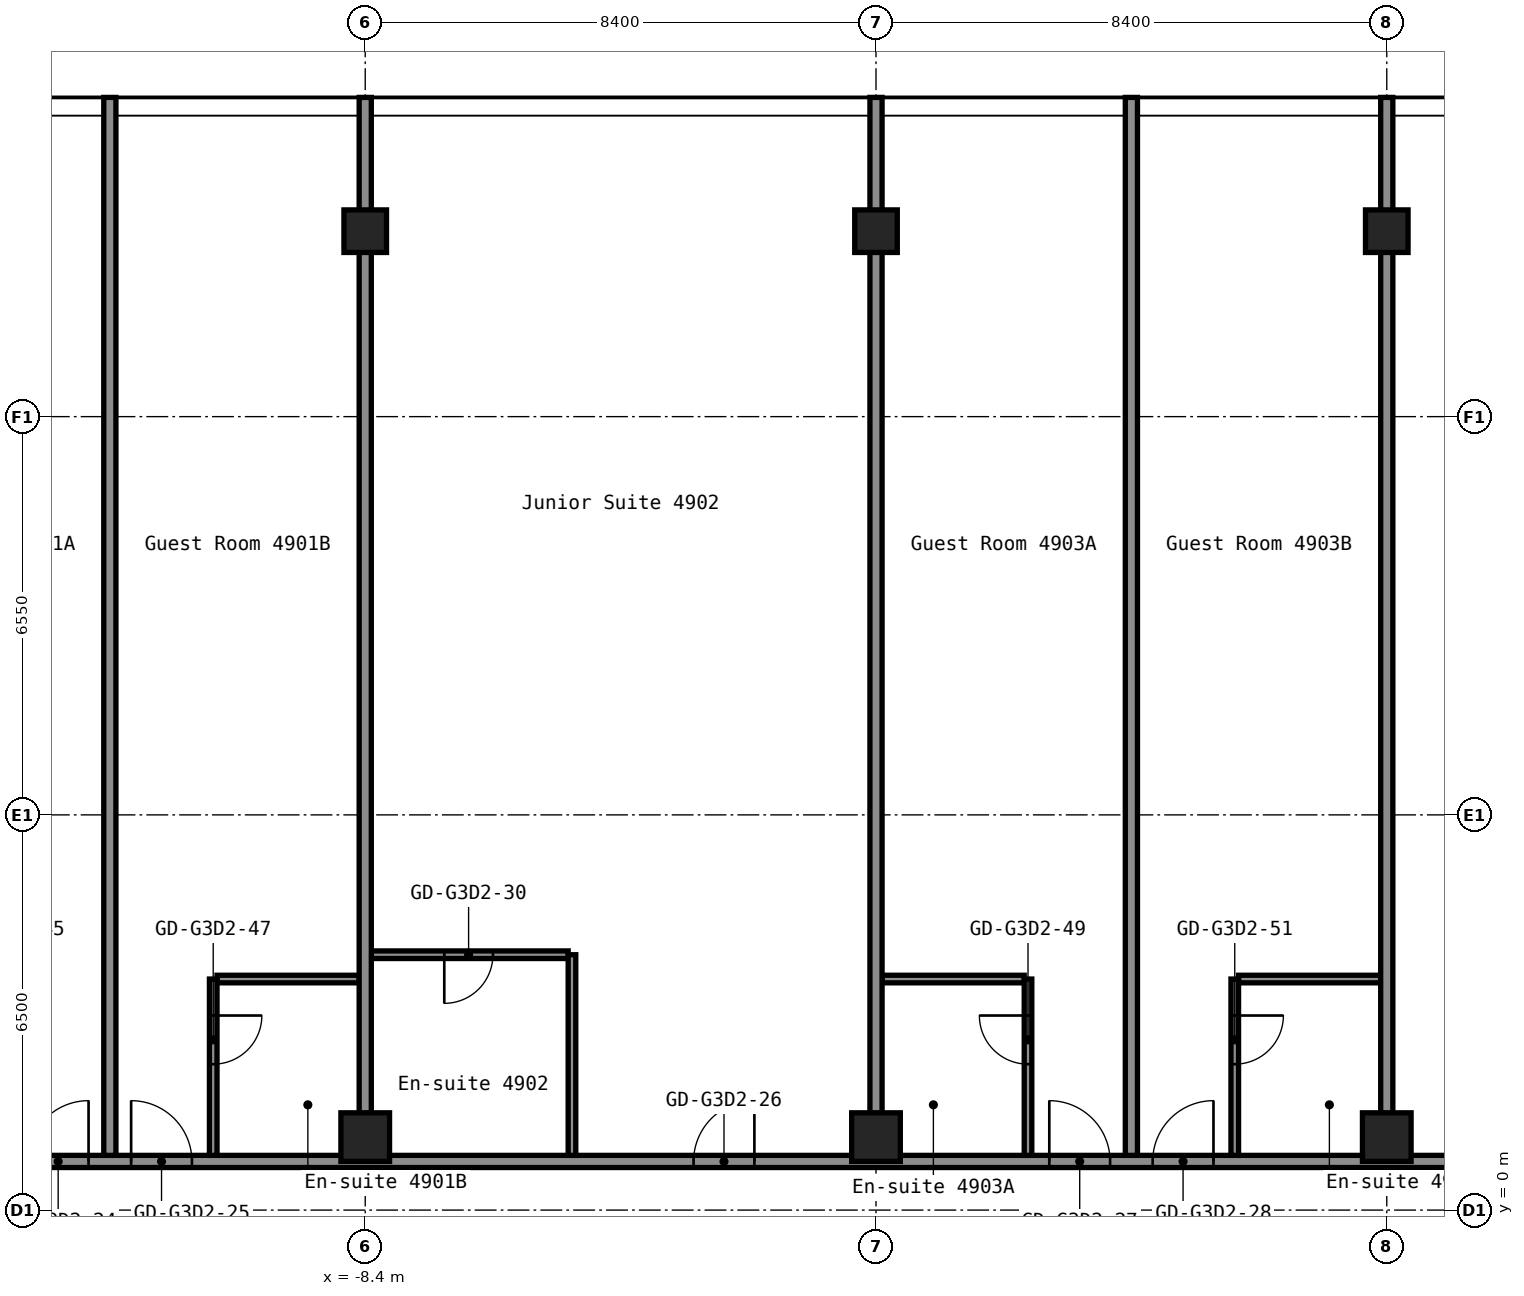
"""IFC4 building model, lengths in metres.
Left out: names, types, materials, properties, quantities, classifications, styles, units other than length and angle.
Written with IfcOpenShell. Run it as: python <this file> out.ifc"""

import sys

from ifc_helpers import new_model, si_unit, direction, frame, frame_2d, origin, origin_2d, place, context, subcontext, project, spatial, rectangle, hollow_rectangle, extrude, element, fill, save


model = new_model("IFC4")
c1 = context("Model", 3, precision=1e-05, world=origin(), true_north=direction((0.0, 1.0)))
c2 = subcontext(c1, "Body", "Model", "MODEL_VIEW")
j1 = project(units=[si_unit("LENGTHUNIT", "METRE"), si_unit("PLANEANGLEUNIT", "RADIAN")], contexts=[c1])
p1 = place(None, origin())
s1 = spatial("IfcSite", under=j1, at=p1, CompositionType="ELEMENT")
p2 = place(p1, origin())
s2 = spatial("IfcBuilding", under=s1, at=p2, CompositionType="ELEMENT")
p3 = place(p2, frame((0.0, 0.0, 172.6)))
s3 = spatial("IfcBuildingStorey", under=s2, at=p3, CompositionType="ELEMENT", Elevation=172.6)
p4 = place(p3, frame((-8.4, 1.2, 0.0), z_axis=(0.0, 0.0, 1.0), x_axis=(1.0, 0.0, 0.0)))
e1 = element("IfcColumn", 1, at=p4, inside=s3, PredefinedType="COLUMN", context=c2, shape_type="SweptSolid", body=[
    extrude(hollow_rectangle(XDim=0.8, YDim=0.8, WallThickness=0.032, at=origin_2d()), origin(), (0.0, 0.0, 1.0), 2.9),
])
p5 = place(p3, frame((-8.4, 16.1, 0.0), z_axis=(0.0, 0.0, 1.0), x_axis=(1.0, 0.0, 0.0)))
e2 = element("IfcColumn", 2, at=p5, inside=s3, PredefinedType="COLUMN", context=c2, shape_type="SweptSolid", body=[
    extrude(hollow_rectangle(XDim=0.7, YDim=0.7, WallThickness=0.028, at=origin_2d()), origin(), (0.0, 0.0, 1.0), 2.9),
])
p6 = place(p3, frame((0.0, 1.2, 0.0), z_axis=(0.0, 0.0, 1.0), x_axis=(1.0, 0.0, 0.0)))
e3 = element("IfcColumn", 3, at=p6, inside=s3, PredefinedType="COLUMN", context=c2, shape_type="SweptSolid", body=[
    extrude(hollow_rectangle(XDim=0.8, YDim=0.8, WallThickness=0.032, at=origin_2d()), origin(), (0.0, 0.0, 1.0), 2.9),
])
p7 = place(p3, frame((0.0, 16.1, 0.0), z_axis=(0.0, 0.0, 1.0), x_axis=(1.0, 0.0, 0.0)))
e4 = element("IfcColumn", 4, at=p7, inside=s3, PredefinedType="COLUMN", context=c2, shape_type="SweptSolid", body=[
    extrude(hollow_rectangle(XDim=0.7, YDim=0.7, WallThickness=0.028, at=origin_2d()), origin(), (0.0, 0.0, 1.0), 2.9),
])
p8 = place(p3, frame((8.4, 1.2, 0.0), z_axis=(0.0, 0.0, 1.0), x_axis=(1.0, 0.0, 0.0)))
e5 = element("IfcColumn", 5, at=p8, inside=s3, PredefinedType="COLUMN", context=c2, shape_type="SweptSolid", body=[
    extrude(hollow_rectangle(XDim=0.8, YDim=0.8, WallThickness=0.032, at=origin_2d()), origin(), (0.0, 0.0, 1.0), 2.9),
])
p9 = place(p3, frame((8.4, 16.1, 0.0), z_axis=(0.0, 0.0, 1.0), x_axis=(1.0, 0.0, 0.0)))
e6 = element("IfcColumn", 6, at=p9, inside=s3, PredefinedType="COLUMN", context=c2, shape_type="SweptSolid", body=[
    extrude(hollow_rectangle(XDim=0.7, YDim=0.7, WallThickness=0.028, at=origin_2d()), origin(), (0.0, 0.0, 1.0), 2.9),
])
p10 = place(p3, frame((-16.8, 0.8, 0.0), z_axis=(0.0, 0.0, 1.0), x_axis=(1.0, 0.0, 0.0)))
e7 = element("IfcWall", 7, at=p10, inside=s3, PredefinedType="PARTITIONING", context=c2, shape_type="SweptSolid", body=[
    extrude(rectangle(XDim=33.6, YDim=0.2, at=frame_2d((16.8, 0.0))), origin(), (0.0, 0.0, 1.0), 2.9),
])
p11 = place(p10, frame((2.85, 0.0, 0.0)))
e8 = element("IfcOpeningElement", 8, at=p11, cuts=e7, PredefinedType="OPENING", context=c2, shape_type="SweptSolid", body=[
    extrude(rectangle(XDim=1.0, YDim=2.1, at=frame_2d((0.5, 1.05))), frame((0.0, 0.11, 0.0), z_axis=(0.0, -1.0, 0.0), x_axis=(1.0, 0.0, 0.0)), (0.0, 0.0, 1.0), 0.22),
])
p12 = place(p10, frame((4.55, 0.0, 0.0)))
e9 = element("IfcOpeningElement", 9, at=p12, cuts=e7, PredefinedType="OPENING", context=c2, shape_type="SweptSolid", body=[
    extrude(rectangle(XDim=1.0, YDim=2.1, at=frame_2d((0.5, 1.05))), frame((0.0, 0.11, 0.0), z_axis=(0.0, -1.0, 0.0), x_axis=(1.0, 0.0, 0.0)), (0.0, 0.0, 1.0), 0.22),
])
p13 = place(p10, frame((13.8, 0.0, 0.0)))
e10 = element("IfcOpeningElement", 10, at=p13, cuts=e7, PredefinedType="OPENING", context=c2, shape_type="SweptSolid", body=[
    extrude(rectangle(XDim=1.0, YDim=2.1, at=frame_2d((0.5, 1.05))), frame((0.0, 0.11, 0.0), z_axis=(0.0, -1.0, 0.0), x_axis=(1.0, 0.0, 0.0)), (0.0, 0.0, 1.0), 0.22),
])
p14 = place(p10, frame((19.65, 0.0, 0.0)))
e11 = element("IfcOpeningElement", 11, at=p14, cuts=e7, PredefinedType="OPENING", context=c2, shape_type="SweptSolid", body=[
    extrude(rectangle(XDim=1.0, YDim=2.1, at=frame_2d((0.5, 1.05))), frame((0.0, 0.11, 0.0), z_axis=(0.0, -1.0, 0.0), x_axis=(1.0, 0.0, 0.0)), (0.0, 0.0, 1.0), 0.22),
])
p15 = place(p10, frame((21.35, 0.0, 0.0)))
e12 = element("IfcOpeningElement", 12, at=p15, cuts=e7, PredefinedType="OPENING", context=c2, shape_type="SweptSolid", body=[
    extrude(rectangle(XDim=1.0, YDim=2.1, at=frame_2d((0.5, 1.05))), frame((0.0, 0.11, 0.0), z_axis=(0.0, -1.0, 0.0), x_axis=(1.0, 0.0, 0.0)), (0.0, 0.0, 1.0), 0.22),
])
p16 = place(p10, frame((27.1, 0.0, 0.0)))
e13 = element("IfcOpeningElement", 13, at=p16, cuts=e7, PredefinedType="OPENING", context=c2, shape_type="SweptSolid", body=[
    extrude(rectangle(XDim=1.0, YDim=2.1, at=frame_2d((0.5, 1.05))), frame((0.0, 0.11, 0.0), z_axis=(0.0, -1.0, 0.0), x_axis=(1.0, 0.0, 0.0)), (0.0, 0.0, 1.0), 0.22),
])
for number, where, z_axis, x_axis in (
    (14, (-10.837, 3.8, 0.0), (0.0, 0.0, 1.0), (1.0, 0.0, 0.0)),
    (15, (0.1, 3.8, 0.0), (0.0, 0.0, 1.0), (1.0, 0.0, 0.0)),
):
    element("IfcWall", number, at=place(p3, frame(where, z_axis=z_axis, x_axis=x_axis)), inside=s3, PredefinedType="PARTITIONING", context=c2, shape_type="SweptSolid", body=[
        extrude(rectangle(XDim=2.337, YDim=0.125, at=frame_2d((1.169, 0.0))), origin(), (0.0, 0.0, 1.0), 2.9),
    ])
p17 = place(p3, frame((5.962, 3.8, 0.0), z_axis=(0.0, 0.0, 1.0), x_axis=(1.0, 0.0, 0.0)))
e16 = element("IfcWall", 16, at=p17, inside=s3, PredefinedType="PARTITIONING", context=c2, shape_type="SweptSolid", body=[
    extrude(rectangle(XDim=2.338, YDim=0.125, at=frame_2d((1.169, 0.0))), origin(), (0.0, 0.0, 1.0), 2.9),
])
p18 = place(p3, frame((-8.3, 4.2, 0.0), z_axis=(0.0, 0.0, 1.0), x_axis=(1.0, 0.0, 0.0)))
e17 = element("IfcWall", 17, at=p18, inside=s3, PredefinedType="PARTITIONING", context=c2, shape_type="SweptSolid", body=[
    extrude(rectangle(XDim=3.238, YDim=0.125, at=frame_2d((1.619, 0.0))), origin(), (0.0, 0.0, 1.0), 2.9),
])
p19 = place(p18, frame((1.2, 0.0, 0.0)))
e18 = element("IfcOpeningElement", 18, at=p19, cuts=e17, PredefinedType="OPENING", context=c2, shape_type="SweptSolid", body=[
    extrude(rectangle(XDim=0.8, YDim=2.1, at=frame_2d((0.4, 1.05))), frame((0.0, 0.073, 0.0), z_axis=(0.0, -1.0, 0.0), x_axis=(1.0, 0.0, 0.0)), (0.0, 0.0, 1.0), 0.145),
])
p20 = place(p3, frame((-12.6, 0.9, 0.0), z_axis=(0.0, 0.0, 1.0), x_axis=(0.0, 1.0, 0.0)))
e19 = element("IfcWall", 19, at=p20, inside=s3, PredefinedType="PARTITIONING", context=c2, shape_type="SweptSolid", body=[
    extrude(rectangle(XDim=17.4, YDim=0.2, at=frame_2d((8.7, 0.0))), origin(), (0.0, 0.0, 1.0), 2.9),
])
p21 = place(p3, frame((-10.9, 0.9, 0.0), z_axis=(0.0, 0.0, 1.0), x_axis=(0.0, 1.0, 0.0)))
e20 = element("IfcWall", 20, at=p21, inside=s3, PredefinedType="PARTITIONING", context=c2, shape_type="SweptSolid", body=[
    extrude(rectangle(XDim=2.9, YDim=0.125, at=frame_2d((1.45, 0.0))), origin(), (0.0, 0.0, 1.0), 2.9),
])
p22 = place(p21, frame((1.5, 0.0, 0.0)))
e21 = element("IfcOpeningElement", 21, at=p22, cuts=e20, PredefinedType="OPENING", context=c2, shape_type="SweptSolid", body=[
    extrude(rectangle(XDim=0.8, YDim=2.1, at=frame_2d((0.4, 1.05))), frame((0.0, 0.073, 0.0), z_axis=(0.0, -1.0, 0.0), x_axis=(1.0, 0.0, 0.0)), (0.0, 0.0, 1.0), 0.145),
])
p23 = place(p3, frame((-8.4, 1.59, 0.0), z_axis=(0.0, 0.0, 1.0), x_axis=(0.0, 1.0, 0.0)))
e22 = element("IfcWall", 22, at=p23, inside=s3, PredefinedType="PARTITIONING", context=c2, shape_type="SweptSolid", body=[
    extrude(rectangle(XDim=16.71, YDim=0.2, at=frame_2d((8.355, 0.0))), origin(), (0.0, 0.0, 1.0), 2.9),
])
p24 = place(p3, frame((-5.0, 0.9, 0.0), z_axis=(0.0, 0.0, 1.0), x_axis=(0.0, 1.0, 0.0)))
e23 = element("IfcWall", 23, at=p24, inside=s3, PredefinedType="PARTITIONING", context=c2, shape_type="SweptSolid", body=[
    extrude(rectangle(XDim=3.3, YDim=0.125, at=frame_2d((1.65, 0.0))), origin(), (0.0, 0.0, 1.0), 2.9),
])
p25 = place(p3, frame((0.0, 1.59, 0.0), z_axis=(0.0, 0.0, 1.0), x_axis=(0.0, 1.0, 0.0)))
e24 = element("IfcWall", 24, at=p25, inside=s3, PredefinedType="PARTITIONING", context=c2, shape_type="SweptSolid", body=[
    extrude(rectangle(XDim=16.71, YDim=0.2, at=frame_2d((8.355, 0.0))), origin(), (0.0, 0.0, 1.0), 2.9),
])
p26 = place(p3, frame((2.5, 0.9, 0.0), z_axis=(0.0, 0.0, 1.0), x_axis=(0.0, 1.0, 0.0)))
e25 = element("IfcWall", 25, at=p26, inside=s3, PredefinedType="PARTITIONING", context=c2, shape_type="SweptSolid", body=[
    extrude(rectangle(XDim=2.9, YDim=0.125, at=frame_2d((1.45, 0.0))), origin(), (0.0, 0.0, 1.0), 2.9),
])
p27 = place(p26, frame((1.5, 0.0, 0.0)))
e26 = element("IfcOpeningElement", 26, at=p27, cuts=e25, PredefinedType="OPENING", context=c2, shape_type="SweptSolid", body=[
    extrude(rectangle(XDim=0.8, YDim=2.1, at=frame_2d((0.4, 1.05))), frame((0.0, 0.073, 0.0), z_axis=(0.0, -1.0, 0.0), x_axis=(1.0, 0.0, 0.0)), (0.0, 0.0, 1.0), 0.145),
])
p28 = place(p3, frame((4.2, 0.9, 0.0), z_axis=(0.0, 0.0, 1.0), x_axis=(0.0, 1.0, 0.0)))
e27 = element("IfcWall", 27, at=p28, inside=s3, PredefinedType="PARTITIONING", context=c2, shape_type="SweptSolid", body=[
    extrude(rectangle(XDim=17.4, YDim=0.2, at=frame_2d((8.7, 0.0))), origin(), (0.0, 0.0, 1.0), 2.9),
])
p29 = place(p3, frame((5.9, 0.9, 0.0), z_axis=(0.0, 0.0, 1.0), x_axis=(0.0, 1.0, 0.0)))
e28 = element("IfcWall", 28, at=p29, inside=s3, PredefinedType="PARTITIONING", context=c2, shape_type="SweptSolid", body=[
    extrude(rectangle(XDim=2.9, YDim=0.125, at=frame_2d((1.45, 0.0))), origin(), (0.0, 0.0, 1.0), 2.9),
])
p30 = place(p29, frame((1.5, 0.0, 0.0)))
e29 = element("IfcOpeningElement", 29, at=p30, cuts=e28, PredefinedType="OPENING", context=c2, shape_type="SweptSolid", body=[
    extrude(rectangle(XDim=0.8, YDim=2.1, at=frame_2d((0.4, 1.05))), frame((0.0, 0.073, 0.0), z_axis=(0.0, -1.0, 0.0), x_axis=(1.0, 0.0, 0.0)), (0.0, 0.0, 1.0), 0.145),
])
p31 = place(p3, frame((8.4, 1.59, 0.0), z_axis=(0.0, 0.0, 1.0), x_axis=(0.0, 1.0, 0.0)))
e30 = element("IfcWall", 30, at=p31, inside=s3, PredefinedType="PARTITIONING", context=c2, shape_type="SweptSolid", body=[
    extrude(rectangle(XDim=16.71, YDim=0.2, at=frame_2d((8.355, 0.0))), origin(), (0.0, 0.0, 1.0), 2.9),
])
p32 = place(p11, origin())
e31 = element("IfcDoor", 31, at=p32, inside=s3, OperationType="SINGLE_SWING_LEFT", PredefinedType="DOOR", context=c2, shape_type="SweptSolid", body=[
    extrude(rectangle(XDim=1.0, YDim=2.1, at=frame_2d((0.5, 1.05))), frame((0.0, 0.025, 0.0), z_axis=(0.0, -1.0, 0.0), x_axis=(1.0, 0.0, 0.0)), (0.0, 0.0, 1.0), 0.05),
])
fill(e8, e31)
p33 = place(p12, origin())
e32 = element("IfcDoor", 32, at=p33, inside=s3, OperationType="SINGLE_SWING_RIGHT", PredefinedType="DOOR", context=c2, shape_type="SweptSolid", body=[
    extrude(rectangle(XDim=1.0, YDim=2.1, at=frame_2d((0.5, 1.05))), frame((0.0, 0.025, 0.0), z_axis=(0.0, -1.0, 0.0), x_axis=(1.0, 0.0, 0.0)), (0.0, 0.0, 1.0), 0.05),
])
fill(e9, e32)
p34 = place(p13, origin())
e33 = element("IfcDoor", 33, at=p34, inside=s3, OperationType="SINGLE_SWING_LEFT", PredefinedType="DOOR", context=c2, shape_type="SweptSolid", body=[
    extrude(rectangle(XDim=1.0, YDim=2.1, at=frame_2d((0.5, 1.05))), frame((0.0, 0.025, 0.0), z_axis=(0.0, -1.0, 0.0), x_axis=(1.0, 0.0, 0.0)), (0.0, 0.0, 1.0), 0.05),
])
fill(e10, e33)
p35 = place(p14, origin())
e34 = element("IfcDoor", 34, at=p35, inside=s3, OperationType="SINGLE_SWING_RIGHT", PredefinedType="DOOR", context=c2, shape_type="SweptSolid", body=[
    extrude(rectangle(XDim=1.0, YDim=2.1, at=frame_2d((0.5, 1.05))), frame((0.0, 0.025, 0.0), z_axis=(0.0, -1.0, 0.0), x_axis=(1.0, 0.0, 0.0)), (0.0, 0.0, 1.0), 0.05),
])
fill(e11, e34)
p36 = place(p15, origin())
e35 = element("IfcDoor", 35, at=p36, inside=s3, OperationType="SINGLE_SWING_LEFT", PredefinedType="DOOR", context=c2, shape_type="SweptSolid", body=[
    extrude(rectangle(XDim=1.0, YDim=2.1, at=frame_2d((0.5, 1.05))), frame((0.0, 0.025, 0.0), z_axis=(0.0, -1.0, 0.0), x_axis=(1.0, 0.0, 0.0)), (0.0, 0.0, 1.0), 0.05),
])
fill(e12, e35)
p37 = place(p19, origin())
e36 = element("IfcDoor", 36, at=p37, inside=s3, OperationType="SINGLE_SWING_LEFT", PredefinedType="DOOR", context=c2, shape_type="SweptSolid", body=[
    extrude(rectangle(XDim=0.8, YDim=2.1, at=frame_2d((0.4, 1.05))), frame((0.0, 0.025, 0.0), z_axis=(0.0, -1.0, 0.0), x_axis=(1.0, 0.0, 0.0)), (0.0, 0.0, 1.0), 0.05),
])
fill(e18, e36)
p38 = place(p22, origin())
e37 = element("IfcDoor", 37, at=p38, inside=s3, OperationType="SINGLE_SWING_RIGHT", PredefinedType="DOOR", context=c2, shape_type="SweptSolid", body=[
    extrude(rectangle(XDim=0.8, YDim=2.1, at=frame_2d((0.4, 1.05))), frame((0.0, 0.025, 0.0), z_axis=(0.0, -1.0, 0.0), x_axis=(1.0, 0.0, 0.0)), (0.0, 0.0, 1.0), 0.05),
])
fill(e21, e37)
p39 = place(p27, origin())
e38 = element("IfcDoor", 38, at=p39, inside=s3, OperationType="SINGLE_SWING_LEFT", PredefinedType="DOOR", context=c2, shape_type="SweptSolid", body=[
    extrude(rectangle(XDim=0.8, YDim=2.1, at=frame_2d((0.4, 1.05))), frame((0.0, 0.025, 0.0), z_axis=(0.0, -1.0, 0.0), x_axis=(1.0, 0.0, 0.0)), (0.0, 0.0, 1.0), 0.05),
])
fill(e26, e38)
p40 = place(p30, origin())
e39 = element("IfcDoor", 39, at=p40, inside=s3, OperationType="SINGLE_SWING_RIGHT", PredefinedType="DOOR", context=c2, shape_type="SweptSolid", body=[
    extrude(rectangle(XDim=0.8, YDim=2.1, at=frame_2d((0.4, 1.05))), frame((0.0, 0.025, 0.0), z_axis=(0.0, -1.0, 0.0), x_axis=(1.0, 0.0, 0.0)), (0.0, 0.0, 1.0), 0.05),
])
fill(e29, e39)
save(model, sys.argv[1])
